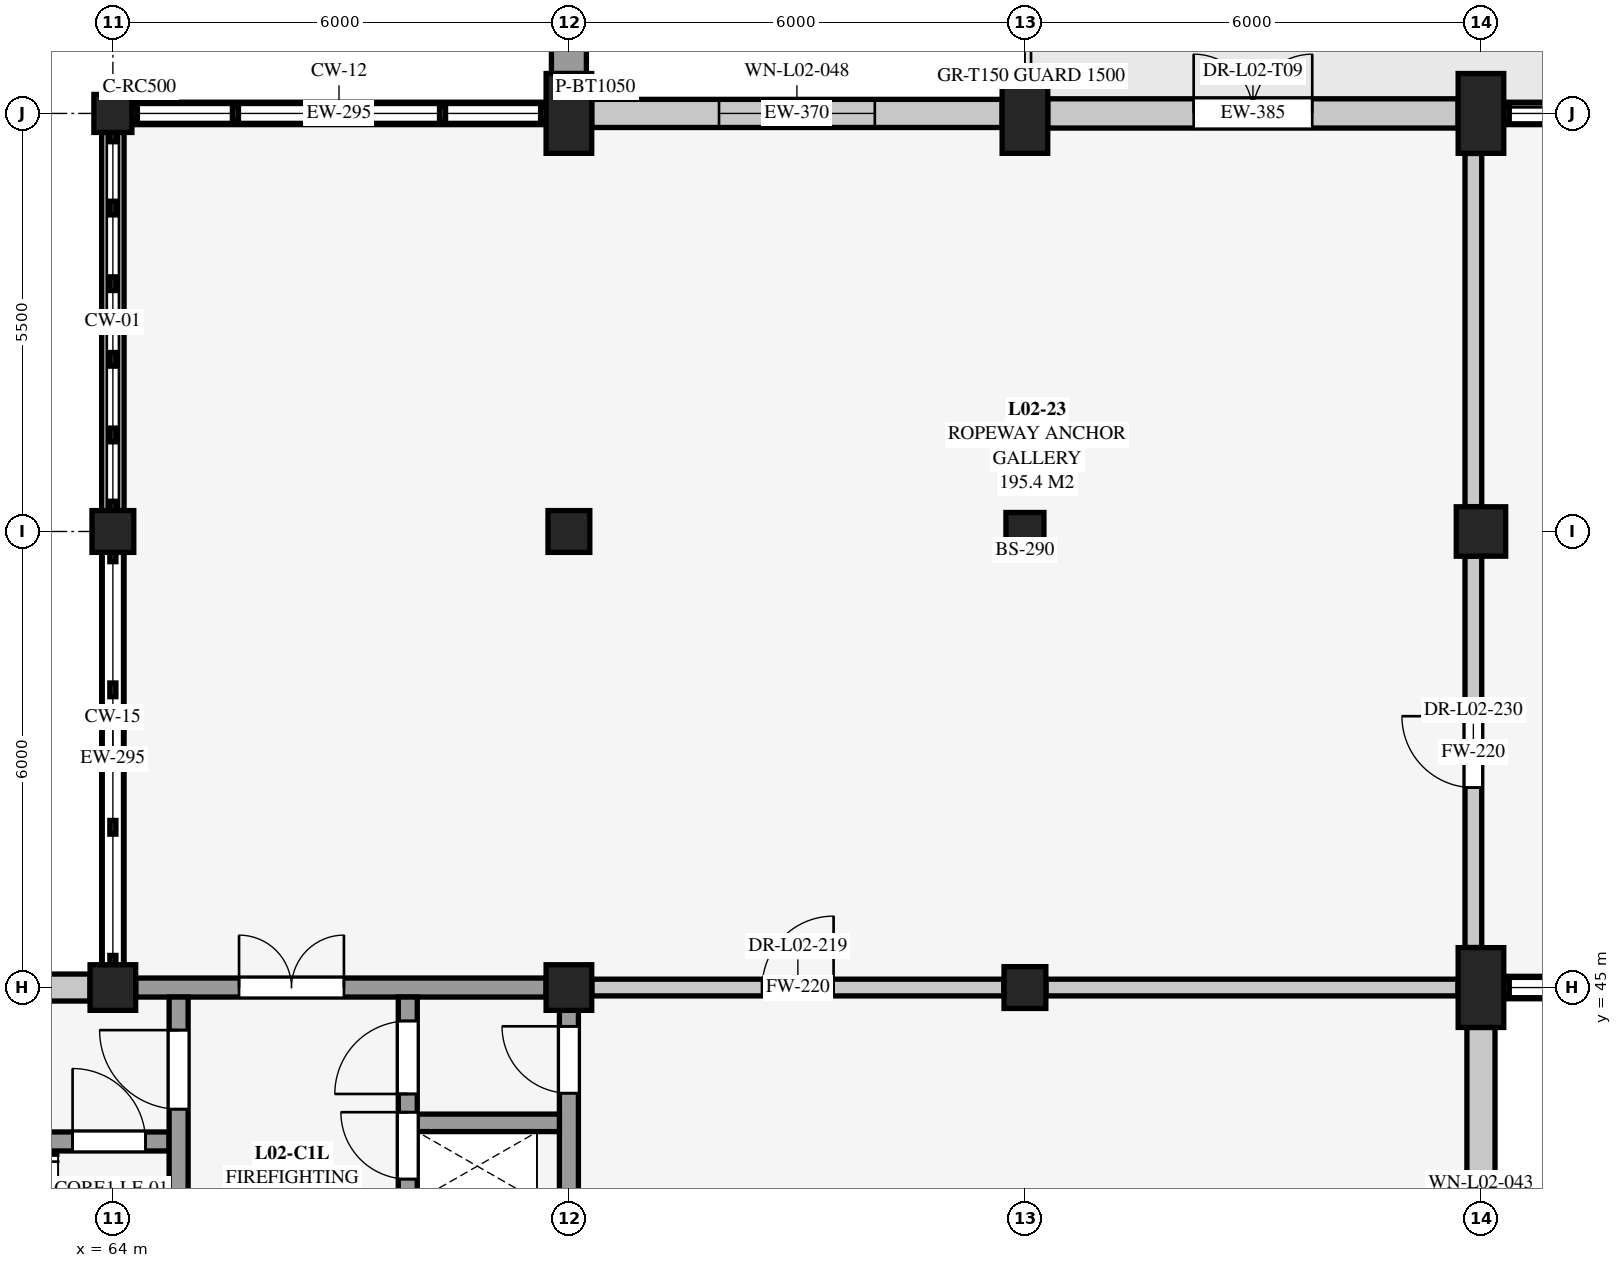
"""IFC4 building model, lengths in metres.
Left out: names, types, materials, properties, quantities, classifications, styles, units other than length and angle.
Written with IfcOpenShell. Run it as: python <this file> out.ifc"""

import sys

from ifc_helpers import new_model, si_unit, direction, frame, frame_2d, origin, origin_2d, place, context, subcontext, project, spatial, rectangle, extrude, element, fill, save


model = new_model("IFC4")
c1 = context("Model", 3, precision=1e-05, world=origin(), true_north=direction((0.0, 1.0)))
c2 = subcontext(c1, "Body", "Model", "MODEL_VIEW")
j1 = project(units=[si_unit("LENGTHUNIT", "METRE"), si_unit("PLANEANGLEUNIT", "RADIAN")], contexts=[c1])
p1 = place(None, origin())
s1 = spatial("IfcSite", under=j1, at=p1, CompositionType="ELEMENT")
p2 = place(p1, origin())
s2 = spatial("IfcBuilding", under=s1, at=p2, CompositionType="ELEMENT")
p3 = place(p2, frame((0.0, 0.0, 4.5)))
s3 = spatial("IfcBuildingStorey", under=s2, at=p3, CompositionType="ELEMENT", Elevation=4.5)
p4 = place(p3, frame((64.0, 45.0, 0.0), z_axis=(0.0, 0.0, 1.0), x_axis=(1.0, 0.0, 0.0)))
e1 = element("IfcColumn", 1, at=p4, inside=s3, PredefinedType="COLUMN", context=c2, shape_type="SweptSolid", body=[
    extrude(rectangle(XDim=0.6, YDim=0.6, at=origin_2d()), origin(), (0.0, 0.0, 1.0), 4.5),
])
p5 = place(p3, frame((64.0, 51.0, 0.0), z_axis=(0.0, 0.0, 1.0), x_axis=(1.0, 0.0, 0.0)))
e2 = element("IfcColumn", 2, at=p5, inside=s3, PredefinedType="COLUMN", context=c2, shape_type="SweptSolid", body=[
    extrude(rectangle(XDim=0.55, YDim=0.55, at=origin_2d()), origin(), (0.0, 0.0, 1.0), 4.5),
])
p6 = place(p3, frame((64.0, 56.5, 0.0), z_axis=(0.0, 0.0, 1.0), x_axis=(1.0, 0.0, 0.0)))
e3 = element("IfcColumn", 3, at=p6, inside=s3, PredefinedType="COLUMN", context=c2, shape_type="SweptSolid", body=[
    extrude(rectangle(XDim=0.5, YDim=0.5, at=origin_2d()), origin(), (0.0, 0.0, 1.0), 4.5),
])
p7 = place(p3, frame((70.0, 45.0, 0.0), z_axis=(0.0, 0.0, 1.0), x_axis=(1.0, 0.0, 0.0)))
e4 = element("IfcColumn", 4, at=p7, inside=s3, PredefinedType="COLUMN", context=c2, shape_type="SweptSolid", body=[
    extrude(rectangle(XDim=0.6, YDim=0.6, at=origin_2d()), origin(), (0.0, 0.0, 1.0), 4.5),
])
p8 = place(p3, frame((70.0, 51.0, 0.0), z_axis=(0.0, 0.0, 1.0), x_axis=(1.0, 0.0, 0.0)))
e5 = element("IfcColumn", 5, at=p8, inside=s3, PredefinedType="COLUMN", context=c2, shape_type="SweptSolid", body=[
    extrude(rectangle(XDim=0.55, YDim=0.55, at=origin_2d()), origin(), (0.0, 0.0, 1.0), 4.5),
])
p9 = place(p3, frame((70.0, 56.5, 0.0), z_axis=(0.0, 0.0, 1.0), x_axis=(1.0, 0.0, 0.0)))
e6 = element("IfcColumn", 6, at=p9, inside=s3, PredefinedType="PILASTER", context=c2, shape_type="SweptSolid", body=[
    extrude(rectangle(XDim=0.6, YDim=1.05, at=origin_2d()), origin(), (0.0, 0.0, 1.0), 4.5),
])
p10 = place(p3, frame((76.0, 45.0, 0.0), z_axis=(0.0, 0.0, 1.0), x_axis=(1.0, 0.0, 0.0)))
e7 = element("IfcColumn", 7, at=p10, inside=s3, PredefinedType="COLUMN", context=c2, shape_type="SweptSolid", body=[
    extrude(rectangle(XDim=0.55, YDim=0.55, at=origin_2d()), origin(), (0.0, 0.0, 1.0), 4.5),
])
p11 = place(p3, frame((76.0, 51.0, 0.0), z_axis=(0.0, 0.0, 1.0), x_axis=(1.0, 0.0, 0.0)))
e8 = element("IfcColumn", 8, at=p11, inside=s3, PredefinedType="COLUMN", context=c2, shape_type="SweptSolid", body=[
    extrude(rectangle(XDim=0.5, YDim=0.5, at=origin_2d()), origin(), (0.0, 0.0, 1.0), 4.5),
])
for number, where, z_axis, x_axis in (
    (9, (76.0, 56.5, 0.0), (0.0, 0.0, 1.0), (1.0, 0.0, 0.0)),
    (10, (82.0, 45.0, 0.0), (0.0, 0.0, 1.0), (1.0, 0.0, 0.0)),
):
    element("IfcColumn", number, at=place(p3, frame(where, z_axis=z_axis, x_axis=x_axis)), inside=s3, PredefinedType="PILASTER", context=c2, shape_type="SweptSolid", body=[
        extrude(rectangle(XDim=0.6, YDim=1.05, at=origin_2d()), origin(), (0.0, 0.0, 1.0), 4.5),
    ])
p12 = place(p3, frame((82.0, 51.0, 0.0), z_axis=(0.0, 0.0, 1.0), x_axis=(1.0, 0.0, 0.0)))
e11 = element("IfcColumn", 11, at=p12, inside=s3, PredefinedType="COLUMN", context=c2, shape_type="SweptSolid", body=[
    extrude(rectangle(XDim=0.65, YDim=0.65, at=origin_2d()), origin(), (0.0, 0.0, 1.0), 4.5),
])
p13 = place(p3, frame((82.0, 56.5, 0.0), z_axis=(0.0, 0.0, 1.0), x_axis=(1.0, 0.0, 0.0)))
e12 = element("IfcColumn", 12, at=p13, inside=s3, PredefinedType="PILASTER", context=c2, shape_type="SweptSolid", body=[
    extrude(rectangle(XDim=0.6, YDim=1.05, at=origin_2d()), origin(), (0.0, 0.0, 1.0), 4.5),
])
p14 = place(p3, frame((70.0, 57.025, 0.0), z_axis=(0.0, 0.0, 1.0), x_axis=(0.0, 1.0, 0.0)))
e13 = element("IfcWall", 13, at=p14, inside=s3, PredefinedType="USERDEFINED", context=c2, shape_type="SweptSolid", body=[
    extrude(rectangle(XDim=4.2, YDim=0.46, at=frame_2d((2.1, 0.0))), origin(), (0.0, 0.0, 1.0), 4.5),
])
p15 = place(p3, frame((58.25, 45.0, 0.0), z_axis=(0.0, 0.0, 1.0), x_axis=(1.0, 0.0, 0.0)))
e14 = element("IfcWall", 14, at=p15, inside=s3, PredefinedType="SOLIDWALL", context=c2, shape_type="SweptSolid", body=[
    extrude(rectangle(XDim=5.45, YDim=0.355, at=frame_2d((2.725, 0.0))), origin(), (0.0, 0.0, 1.0), 3.697),
])
p16 = place(p3, frame((82.0, 44.475, 0.0), z_axis=(0.0, 0.0, 1.0), x_axis=(0.0, -1.0, 0.0)))
e15 = element("IfcWall", 15, at=p16, inside=s3, PredefinedType="SOLIDWALL", context=c2, shape_type="SweptSolid", body=[
    extrude(rectangle(XDim=5.2, YDim=0.37, at=frame_2d((2.6, 0.0))), origin(), (0.0, 0.0, 1.0), 3.821),
])
p17 = place(p16, frame((1.95, 0.0, 1.3)))
e16 = element("IfcOpeningElement", 16, at=p17, cuts=e15, PredefinedType="OPENING", context=c2, shape_type="SweptSolid", body=[
    extrude(rectangle(XDim=1.3, YDim=1.45, at=frame_2d((0.65, 0.725))), frame((0.0, 0.195, 0.0), z_axis=(0.0, -1.0, 0.0), x_axis=(1.0, 0.0, 0.0)), (0.0, 0.0, 1.0), 0.39),
])
p18 = place(p3, frame((64.25, 56.5, 0.0), z_axis=(0.0, 0.0, 1.0), x_axis=(1.0, 0.0, 0.0)))
e17 = element("IfcWall", 17, at=p18, inside=s3, PredefinedType="SOLIDWALL", context=c2, shape_type="SweptSolid", body=[
    extrude(rectangle(XDim=5.45, YDim=0.295, at=frame_2d((2.725, 0.0))), origin(), (0.0, 0.0, 1.0), 0.31),
])
p19 = place(p3, frame((70.3, 56.5, 0.0), z_axis=(0.0, 0.0, 1.0), x_axis=(1.0, 0.0, 0.0)))
e18 = element("IfcWall", 18, at=p19, inside=s3, PredefinedType="SOLIDWALL", context=c2, shape_type="SweptSolid", body=[
    extrude(rectangle(XDim=5.4, YDim=0.37, at=frame_2d((2.7, 0.0))), origin(), (0.0, 0.0, 1.0), 3.763),
])
p20 = place(p19, frame((1.675, 0.0, 1.2)))
e19 = element("IfcOpeningElement", 19, at=p20, cuts=e18, PredefinedType="OPENING", context=c2, shape_type="SweptSolid", body=[
    extrude(rectangle(XDim=2.05, YDim=1.55, at=frame_2d((1.025, 0.775))), frame((0.0, 0.195, 0.0), z_axis=(0.0, -1.0, 0.0), x_axis=(1.0, 0.0, 0.0)), (0.0, 0.0, 1.0), 0.39),
])
p21 = place(p3, frame((76.3, 56.5, 0.0), z_axis=(0.0, 0.0, 1.0), x_axis=(1.0, 0.0, 0.0)))
e20 = element("IfcWall", 20, at=p21, inside=s3, PredefinedType="SOLIDWALL", context=c2, shape_type="SweptSolid", body=[
    extrude(rectangle(XDim=5.4, YDim=0.385, at=frame_2d((2.7, 0.0))), origin(), (0.0, 0.0, 1.0), 3.857),
])
p22 = place(p21, frame((1.92, 0.0, 0.0)))
e21 = element("IfcOpeningElement", 21, at=p22, cuts=e20, PredefinedType="OPENING", context=c2, shape_type="SweptSolid", body=[
    extrude(rectangle(XDim=1.56, YDim=2.18, at=frame_2d((0.78, 1.09))), frame((0.0, 0.202, 0.0), z_axis=(0.0, -1.0, 0.0), x_axis=(1.0, 0.0, 0.0)), (0.0, 0.0, 1.0), 0.405),
])
p23 = place(p3, frame((87.7, 45.0, 0.0), z_axis=(0.0, 0.0, 1.0), x_axis=(-1.0, 0.0, 0.0)))
e22 = element("IfcWall", 22, at=p23, inside=s3, PredefinedType="SOLIDWALL", context=c2, shape_type="SweptSolid", body=[
    extrude(rectangle(XDim=5.4, YDim=0.295, at=frame_2d((2.7, 0.0))), origin(), (0.0, 0.0, 1.0), 0.36),
])
p24 = place(p3, frame((82.3, 56.5, 0.0), z_axis=(0.0, 0.0, 1.0), x_axis=(1.0, 0.0, 0.0)))
e23 = element("IfcWall", 23, at=p24, inside=s3, PredefinedType="SOLIDWALL", context=c2, shape_type="SweptSolid", body=[
    extrude(rectangle(XDim=5.4, YDim=0.295, at=frame_2d((2.7, 0.0))), origin(), (0.0, 0.0, 1.0), 0.41),
])
p25 = place(p3, frame((64.0, 45.3, 0.0), z_axis=(0.0, 0.0, 1.0), x_axis=(0.0, 1.0, 0.0)))
e24 = element("IfcWall", 24, at=p25, inside=s3, PredefinedType="SOLIDWALL", context=c2, shape_type="SweptSolid", body=[
    extrude(rectangle(XDim=5.425, YDim=0.295, at=frame_2d((2.712, 0.0))), origin(), (0.0, 0.0, 1.0), 0.46),
])
p26 = place(p3, frame((64.0, 51.275, 0.0), z_axis=(0.0, 0.0, 1.0), x_axis=(0.0, 1.0, 0.0)))
e25 = element("IfcWall", 25, at=p26, inside=s3, PredefinedType="SOLIDWALL", context=c2, shape_type="SweptSolid", body=[
    extrude(rectangle(XDim=4.975, YDim=0.295, at=frame_2d((2.488, 0.0))), origin(), (0.0, 0.0, 1.0), 0.16),
])
p27 = place(p3, frame((64.3, 45.0, 0.0), z_axis=(0.0, 0.0, 1.0), x_axis=(1.0, 0.0, 0.0)))
e26 = element("IfcWall", 26, at=p27, inside=s3, PredefinedType="SHEAR", context=c2, shape_type="SweptSolid", body=[
    extrude(rectangle(XDim=5.4, YDim=0.25, at=frame_2d((2.7, 0.0))), origin(), (0.0, 0.0, 1.0), 4.228),
])
p28 = place(p27, frame((1.36, 0.0, 0.0)))
e27 = element("IfcOpeningElement", 27, at=p28, cuts=e26, PredefinedType="OPENING", context=c2, shape_type="SweptSolid", body=[
    extrude(rectangle(XDim=1.38, YDim=2.16, at=frame_2d((0.69, 1.08))), frame((0.0, 0.135, 0.0), z_axis=(0.0, -1.0, 0.0), x_axis=(1.0, 0.0, 0.0)), (0.0, 0.0, 1.0), 0.27),
])
p29 = place(p3, frame((70.0, 39.325, 0.0), z_axis=(0.0, 0.0, 1.0), x_axis=(0.0, 1.0, 0.0)))
e28 = element("IfcWall", 28, at=p29, inside=s3, PredefinedType="SHEAR", context=c2, shape_type="SweptSolid", body=[
    extrude(rectangle(XDim=5.375, YDim=0.25, at=frame_2d((2.688, 0.0))), origin(), (0.0, 0.0, 1.0), 4.228),
])
p30 = place(p29, frame((4.285, 0.0, 0.0)))
e29 = element("IfcOpeningElement", 29, at=p30, cuts=e28, PredefinedType="OPENING", context=c2, shape_type="SweptSolid", body=[
    extrude(rectangle(XDim=0.88, YDim=2.08, at=frame_2d((0.44, 1.04))), frame((0.0, 0.135, 0.0), z_axis=(0.0, -1.0, 0.0), x_axis=(1.0, 0.0, 0.0)), (0.0, 0.0, 1.0), 0.27),
])
p31 = place(p3, frame((63.16, 42.975, 0.0), z_axis=(0.0, 0.0, 1.0), x_axis=(1.0, 0.0, 0.0)))
e30 = element("IfcWall", 30, at=p31, inside=s3, PredefinedType="SHEAR", context=c2, shape_type="SweptSolid", body=[
    extrude(rectangle(XDim=1.58, YDim=0.25, at=frame_2d((0.79, 0.0))), origin(), (0.0, 0.0, 1.0), 4.228),
])
p32 = place(p31, frame((0.31, 0.0, 0.0)))
e31 = element("IfcOpeningElement", 31, at=p32, cuts=e30, PredefinedType="OPENING", context=c2, shape_type="SweptSolid", body=[
    extrude(rectangle(XDim=0.96, YDim=2.12, at=frame_2d((0.48, 1.06))), frame((0.0, 0.135, 0.0), z_axis=(0.0, -1.0, 0.0), x_axis=(1.0, 0.0, 0.0)), (0.0, 0.0, 1.0), 0.27),
])
p33 = place(p3, frame((64.865, 39.125, 0.0), z_axis=(0.0, 0.0, 1.0), x_axis=(0.0, 1.0, 0.0)))
e32 = element("IfcWall", 32, at=p33, inside=s3, PredefinedType="SHEAR", context=c2, shape_type="SweptSolid", body=[
    extrude(rectangle(XDim=5.75, YDim=0.25, at=frame_2d((2.875, 0.0))), origin(), (0.0, 0.0, 1.0), 4.228),
])
p34 = place(p33, frame((4.275, 0.0, 0.0)))
e33 = element("IfcOpeningElement", 33, at=p34, cuts=e32, PredefinedType="OPENING", context=c2, shape_type="SweptSolid", body=[
    extrude(rectangle(XDim=1.04, YDim=2.14, at=frame_2d((0.52, 1.07))), frame((0.0, 0.135, 0.0), z_axis=(0.0, -1.0, 0.0), x_axis=(1.0, 0.0, 0.0)), (0.0, 0.0, 1.0), 0.27),
])
p35 = place(p33, frame((1.445, 0.0, 0.0)))
e34 = element("IfcOpeningElement", 34, at=p35, cuts=e32, PredefinedType="OPENING", context=c2, shape_type="SweptSolid", body=[
    extrude(rectangle(XDim=0.96, YDim=2.12, at=frame_2d((0.48, 1.06))), frame((0.0, 0.135, 0.0), z_axis=(0.0, -1.0, 0.0), x_axis=(1.0, 0.0, 0.0)), (0.0, 0.0, 1.0), 0.27),
])
p36 = place(p3, frame((67.88, 42.2, 0.0), z_axis=(0.0, 0.0, 1.0), x_axis=(0.0, 1.0, 0.0)))
e35 = element("IfcWall", 35, at=p36, inside=s3, PredefinedType="SHEAR", context=c2, shape_type="SweptSolid", body=[
    extrude(rectangle(XDim=2.675, YDim=0.25, at=frame_2d((1.337, 0.0))), origin(), (0.0, 0.0, 1.0), 4.228),
])
p37 = place(p36, frame((0.28, 0.0, 0.0)))
e36 = element("IfcOpeningElement", 36, at=p37, cuts=e35, PredefinedType="OPENING", context=c2, shape_type="SweptSolid", body=[
    extrude(rectangle(XDim=0.88, YDim=2.08, at=frame_2d((0.44, 1.04))), frame((0.0, 0.135, 0.0), z_axis=(0.0, -1.0, 0.0), x_axis=(1.0, 0.0, 0.0)), (0.0, 0.0, 1.0), 0.27),
])
p38 = place(p36, frame((1.4, 0.0, 0.0)))
e37 = element("IfcOpeningElement", 37, at=p38, cuts=e35, PredefinedType="OPENING", context=c2, shape_type="SweptSolid", body=[
    extrude(rectangle(XDim=0.96, YDim=2.12, at=frame_2d((0.48, 1.06))), frame((0.0, 0.135, 0.0), z_axis=(0.0, -1.0, 0.0), x_axis=(1.0, 0.0, 0.0)), (0.0, 0.0, 1.0), 0.27),
])
p39 = place(p3, frame((68.005, 43.22, 0.0), z_axis=(0.0, 0.0, 1.0), x_axis=(1.0, 0.0, 0.0)))
e38 = element("IfcWall", 38, at=p39, inside=s3, PredefinedType="SHEAR", context=c2, shape_type="SweptSolid", body=[
    extrude(rectangle(XDim=1.87, YDim=0.23, at=frame_2d((0.935, 0.0))), origin(), (0.0, 0.0, 1.0), 4.228),
])
p40 = place(p3, frame((70.302, 45.0, 0.0), z_axis=(0.0, 0.0, 1.0), x_axis=(1.0, 0.0, 0.0)))
e39 = element("IfcWall", 39, at=p40, inside=s3, PredefinedType="SOLIDWALL", context=c2, shape_type="SweptSolid", body=[
    extrude(rectangle(XDim=5.421, YDim=0.22, at=frame_2d((2.71, 0.0))), origin(), (0.0, 0.0, 1.0), 3.765),
])
p41 = place(p40, frame((2.24, 0.0, 0.0)))
e40 = element("IfcOpeningElement", 40, at=p41, cuts=e39, PredefinedType="OPENING", context=c2, shape_type="SweptSolid", body=[
    extrude(rectangle(XDim=0.94, YDim=2.1, at=frame_2d((0.47, 1.05))), frame((0.0, 0.12, 0.0), z_axis=(0.0, -1.0, 0.0), x_axis=(1.0, 0.0, 0.0)), (0.0, 0.0, 1.0), 0.24),
])
p42 = place(p3, frame((76.277, 45.0, 0.0), z_axis=(0.0, 0.0, 1.0), x_axis=(1.0, 0.0, 0.0)))
e41 = element("IfcWall", 41, at=p42, inside=s3, PredefinedType="SOLIDWALL", context=c2, shape_type="SweptSolid", body=[
    extrude(rectangle(XDim=5.421, YDim=0.22, at=frame_2d((2.71, 0.0))), origin(), (0.0, 0.0, 1.0), 3.689),
])
p43 = place(p3, frame((81.9, 45.527, 0.0), z_axis=(0.0, 0.0, 1.0), x_axis=(0.0, 1.0, 0.0)))
e42 = element("IfcWall", 42, at=p43, inside=s3, PredefinedType="SOLIDWALL", context=c2, shape_type="SweptSolid", body=[
    extrude(rectangle(XDim=5.146, YDim=0.22, at=frame_2d((2.573, 0.0))), origin(), (0.0, 0.0, 1.0), 3.62),
])
p44 = place(p43, frame((2.103, 0.0, 0.0)))
e43 = element("IfcOpeningElement", 43, at=p44, cuts=e42, PredefinedType="OPENING", context=c2, shape_type="SweptSolid", body=[
    extrude(rectangle(XDim=0.94, YDim=2.1, at=frame_2d((0.47, 1.05))), frame((0.0, 0.12, 0.0), z_axis=(0.0, -1.0, 0.0), x_axis=(1.0, 0.0, 0.0)), (0.0, 0.0, 1.0), 0.24),
])
p45 = place(p3, frame((81.9, 51.327, 0.0), z_axis=(0.0, 0.0, 1.0), x_axis=(0.0, 1.0, 0.0)))
e44 = element("IfcWall", 44, at=p45, inside=s3, PredefinedType="SOLIDWALL", context=c2, shape_type="SweptSolid", body=[
    extrude(rectangle(XDim=4.646, YDim=0.22, at=frame_2d((2.323, 0.0))), origin(), (0.0, 0.0, 1.0), 4.264),
])
p46 = place(p17, origin())
e45 = element("IfcWindow", 45, at=p46, inside=s3, PartitioningType="SINGLE_PANEL", PredefinedType="WINDOW", context=c2, shape_type="SweptSolid", body=[
    extrude(rectangle(XDim=1.3, YDim=1.45, at=frame_2d((0.65, 0.725))), frame((0.0, 0.03, 0.0), z_axis=(0.0, -1.0, 0.0), x_axis=(1.0, 0.0, 0.0)), (0.0, 0.0, 1.0), 0.06),
])
fill(e16, e45)
p47 = place(p20, origin())
e46 = element("IfcWindow", 46, at=p47, inside=s3, PartitioningType="SINGLE_PANEL", PredefinedType="WINDOW", context=c2, shape_type="SweptSolid", body=[
    extrude(rectangle(XDim=2.05, YDim=1.55, at=frame_2d((1.025, 0.775))), frame((0.0, 0.03, 0.0), z_axis=(0.0, -1.0, 0.0), x_axis=(1.0, 0.0, 0.0)), (0.0, 0.0, 1.0), 0.06),
])
fill(e19, e46)
p48 = place(p22, origin())
e47 = element("IfcDoor", 47, at=p48, inside=s3, OperationType="DOUBLE_DOOR_SINGLE_SWING", PredefinedType="DOOR", context=c2, shape_type="SweptSolid", body=[
    extrude(rectangle(XDim=1.56, YDim=2.18, at=frame_2d((0.78, 1.09))), frame((0.0, 0.025, 0.0), z_axis=(0.0, -1.0, 0.0), x_axis=(1.0, 0.0, 0.0)), (0.0, 0.0, 1.0), 0.05),
])
fill(e21, e47)
p49 = place(p28, origin())
e48 = element("IfcDoor", 48, at=p49, inside=s3, OperationType="DOUBLE_DOOR_SINGLE_SWING", PredefinedType="DOOR", context=c2, shape_type="SweptSolid", body=[
    extrude(rectangle(XDim=1.38, YDim=2.16, at=frame_2d((0.69, 1.08))), frame((0.0, 0.025, 0.0), z_axis=(0.0, -1.0, 0.0), x_axis=(1.0, 0.0, 0.0)), (0.0, 0.0, 1.0), 0.05),
])
fill(e27, e48)
p50 = place(p30, origin())
e49 = element("IfcDoor", 49, at=p50, inside=s3, OperationType="SINGLE_SWING_RIGHT", PredefinedType="DOOR", context=c2, shape_type="SweptSolid", body=[
    extrude(rectangle(XDim=0.88, YDim=2.08, at=frame_2d((0.44, 1.04))), frame((0.0, 0.025, 0.0), z_axis=(0.0, -1.0, 0.0), x_axis=(1.0, 0.0, 0.0)), (0.0, 0.0, 1.0), 0.05),
])
fill(e29, e49)
p51 = place(p32, origin())
e50 = element("IfcDoor", 50, at=p51, inside=s3, OperationType="SINGLE_SWING_LEFT", PredefinedType="DOOR", context=c2, shape_type="SweptSolid", body=[
    extrude(rectangle(XDim=0.96, YDim=2.12, at=frame_2d((0.48, 1.06))), frame((0.0, 0.025, 0.0), z_axis=(0.0, -1.0, 0.0), x_axis=(1.0, 0.0, 0.0)), (0.0, 0.0, 1.0), 0.05),
])
fill(e31, e50)
p52 = place(p34, origin())
e51 = element("IfcDoor", 51, at=p52, inside=s3, OperationType="SINGLE_SWING_RIGHT", PredefinedType="DOOR", context=c2, shape_type="SweptSolid", body=[
    extrude(rectangle(XDim=1.04, YDim=2.14, at=frame_2d((0.52, 1.07))), frame((0.0, 0.025, 0.0), z_axis=(0.0, -1.0, 0.0), x_axis=(1.0, 0.0, 0.0)), (0.0, 0.0, 1.0), 0.05),
])
fill(e33, e51)
p53 = place(p37, origin())
e52 = element("IfcDoor", 52, at=p53, inside=s3, OperationType="SINGLE_SWING_RIGHT", PredefinedType="DOOR", context=c2, shape_type="SweptSolid", body=[
    extrude(rectangle(XDim=0.88, YDim=2.08, at=frame_2d((0.44, 1.04))), frame((0.0, 0.025, 0.0), z_axis=(0.0, -1.0, 0.0), x_axis=(1.0, 0.0, 0.0)), (0.0, 0.0, 1.0), 0.05),
])
fill(e36, e52)
p54 = place(p38, origin())
e53 = element("IfcDoor", 53, at=p54, inside=s3, OperationType="SINGLE_SWING_LEFT", PredefinedType="DOOR", context=c2, shape_type="SweptSolid", body=[
    extrude(rectangle(XDim=0.96, YDim=2.12, at=frame_2d((0.48, 1.06))), frame((0.0, 0.025, 0.0), z_axis=(0.0, -1.0, 0.0), x_axis=(1.0, 0.0, 0.0)), (0.0, 0.0, 1.0), 0.05),
])
fill(e37, e53)
p55 = place(p41, origin())
e54 = element("IfcDoor", 54, at=p55, inside=s3, OperationType="SINGLE_SWING_RIGHT", PredefinedType="DOOR", context=c2, shape_type="SweptSolid", body=[
    extrude(rectangle(XDim=0.94, YDim=2.1, at=frame_2d((0.47, 1.05))), frame((0.0, 0.025, 0.0), z_axis=(0.0, -1.0, 0.0), x_axis=(1.0, 0.0, 0.0)), (0.0, 0.0, 1.0), 0.05),
])
fill(e40, e54)
p56 = place(p44, origin())
e55 = element("IfcDoor", 55, at=p56, inside=s3, OperationType="SINGLE_SWING_RIGHT", PredefinedType="DOOR", context=c2, shape_type="SweptSolid", body=[
    extrude(rectangle(XDim=0.94, YDim=2.1, at=frame_2d((0.47, 1.05))), frame((0.0, 0.025, 0.0), z_axis=(0.0, -1.0, 0.0), x_axis=(1.0, 0.0, 0.0)), (0.0, 0.0, 1.0), 0.05),
])
fill(e43, e55)
save(model, sys.argv[1])
